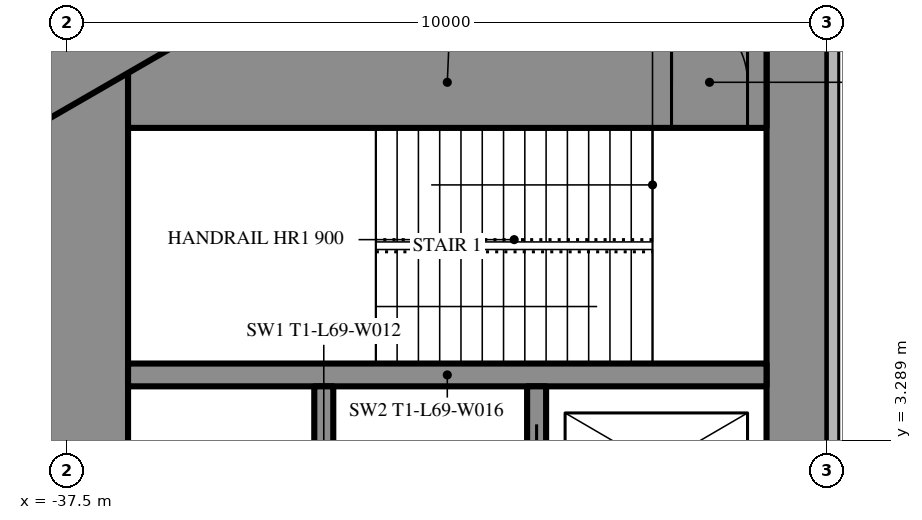
"""IFC4 building model, lengths in metres.
Left out: names, types, materials, properties, quantities, classifications, styles, units other than length and angle.
Written with IfcOpenShell. Run it as: python <this file> out.ifc"""

import sys

from ifc_helpers import new_model, si_unit, direction, frame, frame_2d, origin, place, context, subcontext, project, spatial, rectangle, extrude, element, fill, save


model = new_model("IFC4")
c1 = context("Model", 3, precision=1e-05, world=origin(), true_north=direction((0.0, 1.0)))
c2 = subcontext(c1, "Body", "Model", "MODEL_VIEW")
j1 = project(units=[si_unit("LENGTHUNIT", "METRE"), si_unit("PLANEANGLEUNIT", "RADIAN")], contexts=[c1])
p1 = place(None, origin())
s1 = spatial("IfcSite", under=j1, at=p1, CompositionType="ELEMENT")
p2 = place(p1, origin())
s2 = spatial("IfcBuilding", under=s1, at=p2, CompositionType="ELEMENT")
p3 = place(p2, frame((0.0, 0.0, 263.3)))
s3 = spatial("IfcBuildingStorey", under=s2, at=p3, CompositionType="ELEMENT", Elevation=263.3)
p4 = place(p3, frame((-27.9, 8.6, 0.0), z_axis=(0.0, 0.0, 1.0), x_axis=(0.0, -1.0, 0.0)))
e1 = element("IfcWall", 1, at=p4, inside=s3, PredefinedType="SHEAR", context=c2, shape_type="SweptSolid", body=[
    extrude(rectangle(XDim=17.2, YDim=0.8, at=frame_2d((8.6, 0.0))), origin(), (0.0, 0.0, 1.0), 5.0),
])
p5 = place(p4, frame((6.95, 0.0, 0.0)))
e2 = element("IfcOpeningElement", 2, at=p5, cuts=e1, PredefinedType="OPENING", context=c2, shape_type="SweptSolid", body=[
    extrude(rectangle(XDim=0.9, YDim=2.2, at=frame_2d((0.45, 1.1))), frame((0.0, 0.41, 0.0), z_axis=(0.0, -1.0, 0.0), x_axis=(1.0, 0.0, 0.0)), (0.0, 0.0, 1.0), 0.82),
])
p6 = place(p3, frame((-37.3, 8.6, 0.0), z_axis=(0.0, 0.0, 1.0), x_axis=(0.0, -1.0, 0.0)))
e3 = element("IfcWall", 3, at=p6, inside=s3, PredefinedType="SHEAR", context=c2, shape_type="SweptSolid", body=[
    extrude(rectangle(XDim=17.2, YDim=1.2, at=frame_2d((8.6, 0.0))), origin(), (0.0, 0.0, 1.0), 5.0),
])
p7 = place(p6, frame((7.7, 0.0, 0.0)))
e4 = element("IfcOpeningElement", 4, at=p7, cuts=e3, PredefinedType="OPENING", context=c2, shape_type="SweptSolid", body=[
    extrude(rectangle(XDim=1.8, YDim=2.2, at=frame_2d((0.9, 1.1))), frame((0.0, 0.61, 0.0), z_axis=(0.0, -1.0, 0.0), x_axis=(1.0, 0.0, 0.0)), (0.0, 0.0, 1.0), 1.22),
])
p8 = place(p3, frame((-28.3, 8.0, 0.0), z_axis=(0.0, 0.0, 1.0), x_axis=(-1.0, 0.0, 0.0)))
e5 = element("IfcWall", 5, at=p8, inside=s3, PredefinedType="SHEAR", context=c2, shape_type="SweptSolid", body=[
    extrude(rectangle(XDim=8.4, YDim=1.2, at=frame_2d((4.2, 0.0))), origin(), (0.0, 0.0, 1.0), 5.0),
])
p9 = place(p8, frame((0.25, 0.0, 0.0)))
e6 = element("IfcOpeningElement", 6, at=p9, cuts=e5, PredefinedType="OPENING", context=c2, shape_type="SweptSolid", body=[
    extrude(rectangle(XDim=1.0, YDim=2.2, at=frame_2d((0.5, 1.1))), frame((0.0, 0.61, 0.0), z_axis=(0.0, -1.0, 0.0), x_axis=(1.0, 0.0, 0.0)), (0.0, 0.0, 1.0), 1.22),
])
p10 = place(p3, frame((-28.3, 4.15, 0.0), z_axis=(0.0, 0.0, 1.0), x_axis=(-1.0, 0.0, 0.0)))
e7 = element("IfcWall", 7, at=p10, inside=s3, PredefinedType="SHEAR", context=c2, shape_type="SweptSolid", body=[
    extrude(rectangle(XDim=8.4, YDim=0.3, at=frame_2d((4.2, 0.0))), origin(), (0.0, 0.0, 1.0), 5.0),
])
p11 = place(p3, frame((-31.325, 4.0, 0.0), z_axis=(0.0, 0.0, 1.0), x_axis=(0.0, -1.0, 0.0)))
e8 = element("IfcWall", 8, at=p11, inside=s3, PredefinedType="SHEAR", context=c2, shape_type="SweptSolid", body=[
    extrude(rectangle(XDim=2.1, YDim=0.25, at=frame_2d((1.05, 0.0))), origin(), (0.0, 0.0, 1.0), 5.0),
])
p12 = place(p11, frame((0.5, 0.0, 0.0)))
e9 = element("IfcOpeningElement", 9, at=p12, cuts=e8, PredefinedType="OPENING", context=c2, shape_type="SweptSolid", body=[
    extrude(rectangle(XDim=1.1, YDim=2.2, at=frame_2d((0.55, 1.1))), frame((0.0, 0.135, 0.0), z_axis=(0.0, -1.0, 0.0), x_axis=(1.0, 0.0, 0.0)), (0.0, 0.0, 1.0), 0.27),
])
p13 = place(p3, frame((-34.125, 4.0, 0.0), z_axis=(0.0, 0.0, 1.0), x_axis=(0.0, -1.0, 0.0)))
e10 = element("IfcWall", 10, at=p13, inside=s3, PredefinedType="SHEAR", context=c2, shape_type="SweptSolid", body=[
    extrude(rectangle(XDim=2.35, YDim=0.25, at=frame_2d((1.175, 0.0))), origin(), (0.0, 0.0, 1.0), 5.0),
])
p14 = place(p3, frame((-27.2, 14.3, 0.0), z_axis=(0.0, 0.0, 1.0), x_axis=(-0.866026593062, -0.499997940104, 0.0)))
e11 = element("IfcWall", 11, at=p14, inside=s3, PredefinedType="SHEAR", context=c2, shape_type="SweptSolid", body=[
    extrude(rectangle(XDim=28.946, YDim=1.2, at=frame_2d((14.473, 0.0))), origin(), (0.0, 0.0, 1.0), 5.0),
])
p15 = place(p14, frame((4.6, 0.0, 0.0)))
e12 = element("IfcOpeningElement", 12, at=p15, cuts=e11, PredefinedType="OPENING", context=c2, shape_type="SweptSolid", body=[
    extrude(rectangle(XDim=1.0, YDim=2.2, at=frame_2d((0.5, 1.1))), frame((0.0, 0.61, 0.0), z_axis=(0.0, -1.0, 0.0), x_axis=(1.0, 0.0, 0.0)), (0.0, 0.0, 1.0), 1.22),
])
p16 = place(p14, frame((13.395, 0.0, 0.0)))
e13 = element("IfcOpeningElement", 13, at=p16, cuts=e11, PredefinedType="OPENING", context=c2, shape_type="SweptSolid", body=[
    extrude(rectangle(XDim=1.8, YDim=2.2, at=frame_2d((0.9, 1.1))), frame((0.0, 0.61, 0.0), z_axis=(0.0, -1.0, 0.0), x_axis=(1.0, 0.0, 0.0)), (0.0, 0.0, 1.0), 1.22),
])
p17 = place(p3, frame((-28.737, 16.068, 0.0), z_axis=(0.0, 0.0, 1.0), x_axis=(-0.866026057212, -0.499998868229, 0.0)))
e14 = element("IfcWall", 14, at=p17, inside=s3, PredefinedType="PARTITIONING", context=c2, shape_type="SweptSolid", body=[
    extrude(rectangle(XDim=32.137, YDim=0.2, at=frame_2d((16.068, 0.0))), origin(), (0.0, 0.0, 1.0), 4.75),
])
p18 = place(p17, frame((7.134, 0.0, 0.0)))
e15 = element("IfcOpeningElement", 15, at=p18, cuts=e14, PredefinedType="OPENING", context=c2, shape_type="SweptSolid", body=[
    extrude(rectangle(XDim=2.0, YDim=2.4, at=frame_2d((1.0, 1.2))), frame((0.0, 0.11, 0.0), z_axis=(0.0, -1.0, 0.0), x_axis=(1.0, 0.0, 0.0)), (0.0, 0.0, 1.0), 0.22),
])
p19 = place(p17, frame((17.117, 0.0, 0.0)))
e16 = element("IfcOpeningElement", 16, at=p19, cuts=e14, PredefinedType="OPENING", context=c2, shape_type="SweptSolid", body=[
    extrude(rectangle(XDim=2.0, YDim=2.4, at=frame_2d((1.0, 1.2))), frame((0.0, 0.11, 0.0), z_axis=(0.0, -1.0, 0.0), x_axis=(1.0, 0.0, 0.0)), (0.0, 0.0, 1.0), 0.22),
])
p20 = place(p17, frame((21.266, 0.0, 0.0)))
e17 = element("IfcOpeningElement", 17, at=p20, cuts=e14, PredefinedType="OPENING", context=c2, shape_type="SweptSolid", body=[
    extrude(rectangle(XDim=2.0, YDim=2.4, at=frame_2d((1.0, 1.2))), frame((0.0, 0.11, 0.0), z_axis=(0.0, -1.0, 0.0), x_axis=(1.0, 0.0, 0.0)), (0.0, 0.0, 1.0), 0.22),
])
p21 = place(p17, frame((27.126, 0.0, 0.0)))
e18 = element("IfcOpeningElement", 18, at=p21, cuts=e14, PredefinedType="OPENING", context=c2, shape_type="SweptSolid", body=[
    extrude(rectangle(XDim=2.0, YDim=2.4, at=frame_2d((1.0, 1.2))), frame((0.0, 0.11, 0.0), z_axis=(0.0, -1.0, 0.0), x_axis=(1.0, 0.0, 0.0)), (0.0, 0.0, 1.0), 0.22),
])
p22 = place(p9, origin())
e19 = element("IfcDoor", 19, at=p22, inside=s3, OperationType="SINGLE_SWING_RIGHT", PredefinedType="DOOR", context=c2, shape_type="SweptSolid", body=[
    extrude(rectangle(XDim=1.0, YDim=2.2, at=frame_2d((0.5, 1.1))), frame((0.0, 0.025, 0.0), z_axis=(0.0, -1.0, 0.0), x_axis=(1.0, 0.0, 0.0)), (0.0, 0.0, 1.0), 0.05),
])
fill(e6, e19)
p23 = place(p12, origin())
e20 = element("IfcDoor", 20, at=p23, inside=s3, OperationType="SLIDING_TO_LEFT", PredefinedType="USERDEFINED", context=c2, shape_type="SweptSolid", body=[
    extrude(rectangle(XDim=1.1, YDim=2.2, at=frame_2d((0.55, 1.1))), frame((0.0, 0.025, 0.0), z_axis=(0.0, -1.0, 0.0), x_axis=(1.0, 0.0, 0.0)), (0.0, 0.0, 1.0), 0.05),
])
fill(e9, e20)
save(model, sys.argv[1])
